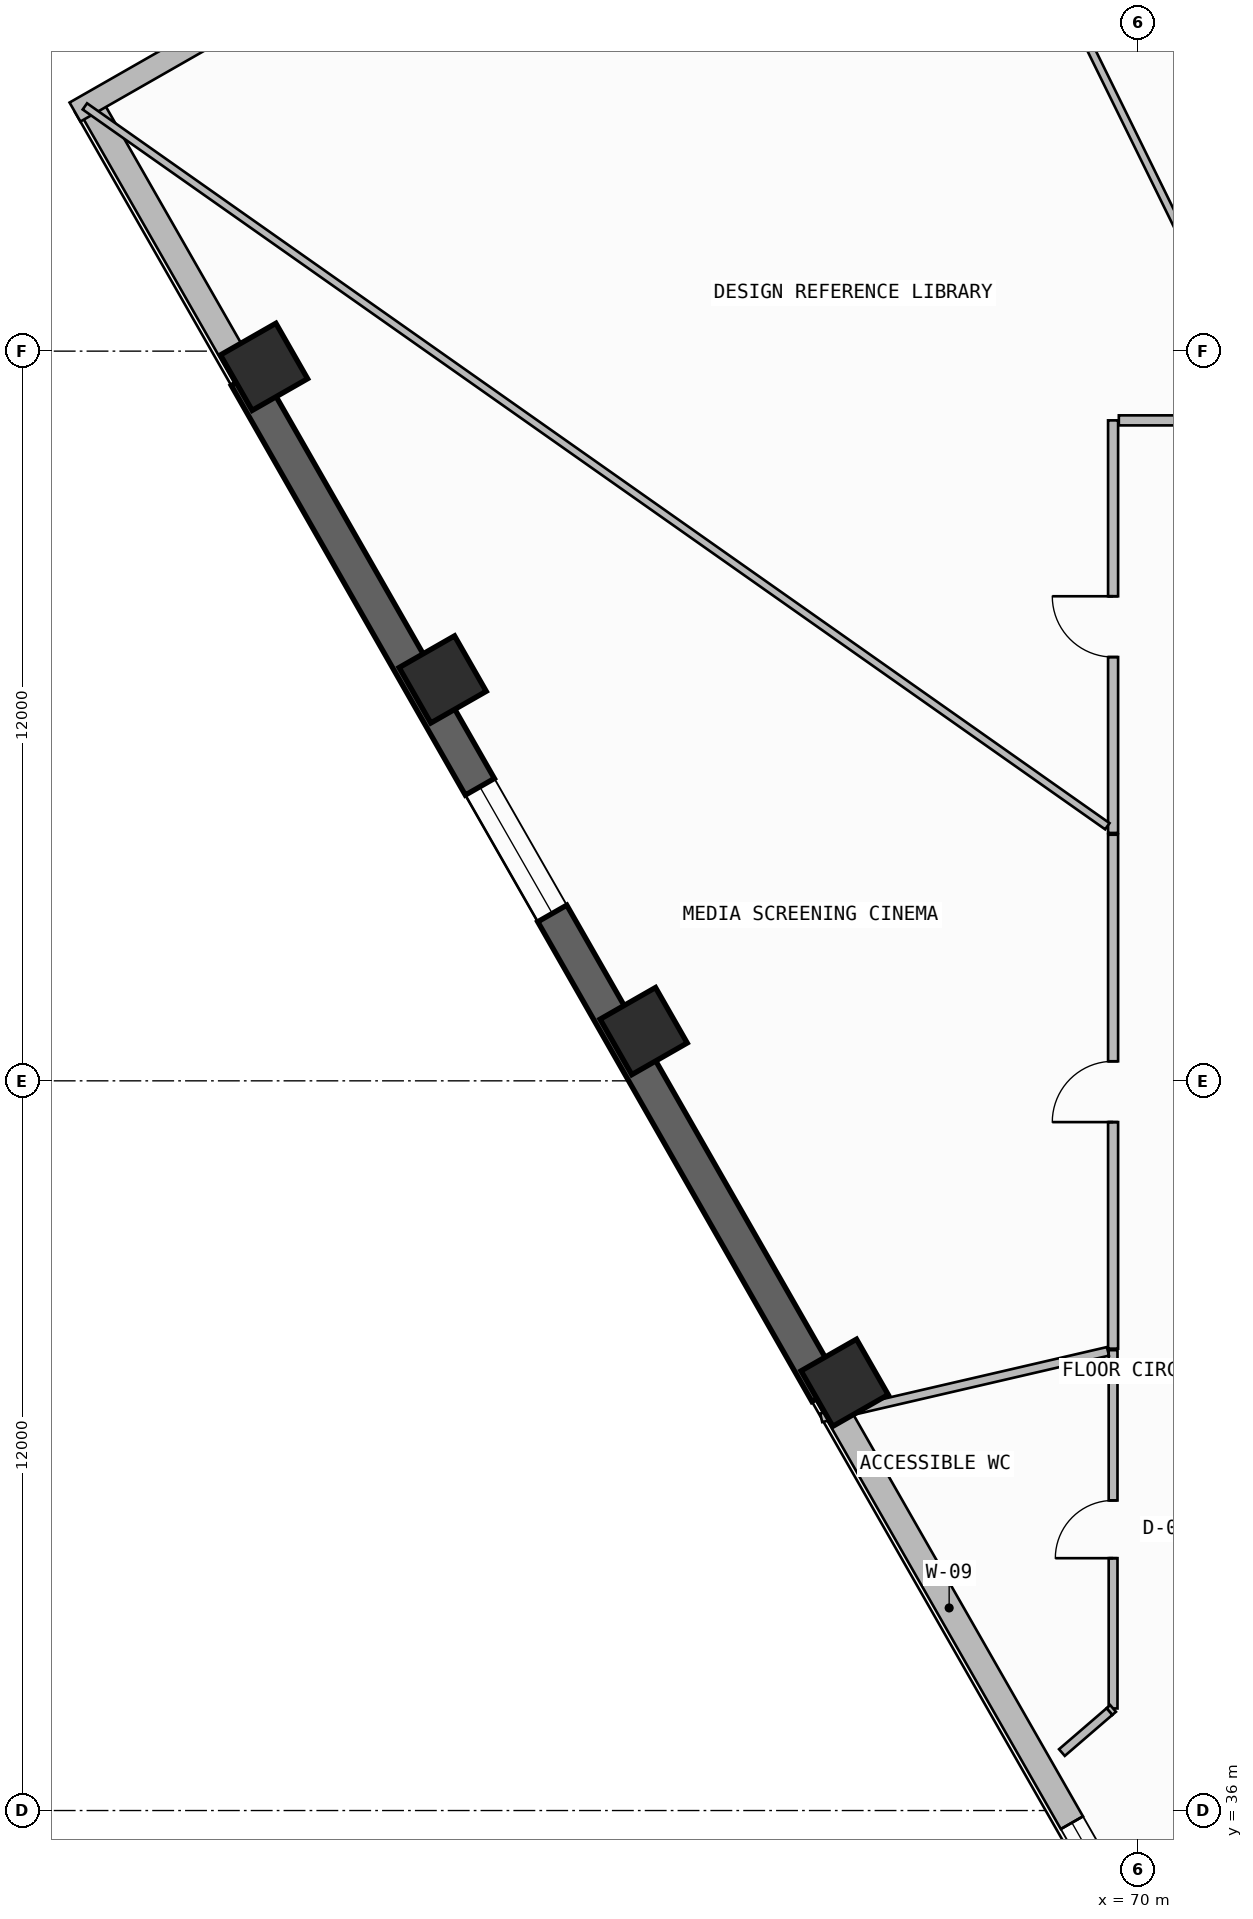
"""IFC4 building model, lengths in metres.
Left out: names, types, materials, properties, quantities, classifications, styles, units other than length and angle.
Written with IfcOpenShell. Run it as: python <this file> out.ifc"""

import sys

from ifc_helpers import new_model, si_unit, direction, frame, frame_2d, origin, origin_2d, place, context, subcontext, project, spatial, rectangle, extrude, element, fill, save


model = new_model("IFC4")
c1 = context("Model", 3, precision=1e-05, world=origin(), true_north=direction((0.0, 1.0)))
c2 = subcontext(c1, "Body", "Model", "MODEL_VIEW")
j1 = project(units=[si_unit("LENGTHUNIT", "METRE"), si_unit("PLANEANGLEUNIT", "RADIAN")], contexts=[c1])
p1 = place(None, origin())
s1 = spatial("IfcSite", under=j1, at=p1, CompositionType="ELEMENT")
p2 = place(p1, origin())
s2 = spatial("IfcBuilding", under=s1, at=p2, CompositionType="ELEMENT")
p3 = place(p2, frame((0.0, 0.0, 214.98)))
s3 = spatial("IfcBuildingStorey", under=s2, at=p3, CompositionType="ELEMENT", Elevation=214.98)
for number, where, z_axis, x_axis in (
    (1, (55.625, 59.742, 0.0), (0.0, 0.0, 1.0), (-0.496, 0.868, 0.0)),
    (2, (58.563, 54.601, 0.0), (0.0, 0.0, 1.0), (-0.496, 0.868, 0.0)),
    (3, (61.868, 48.818, 0.0), (0.0, 0.0, 1.0), (-0.496, 0.868, 0.0)),
    (4, (65.173, 43.035, 0.0), (0.0, 0.0, 1.0), (-0.496, 0.868, 0.0)),
):
    element("IfcColumn", number, at=place(p3, frame(where, z_axis=z_axis, x_axis=x_axis)), inside=s3, PredefinedType="COLUMN", context=c2, shape_type="SweptSolid", body=[
        extrude(rectangle(XDim=1.05, YDim=1.05, at=origin_2d()), origin(), (0.0, 0.0, 1.0), 3.52),
    ])
p4 = place(p3, frame((52.754, 64.068, 0.0), z_axis=(0.0, 0.0, 1.0), x_axis=(0.496209984367, -0.868202540548, 0.0)))
e5 = element("IfcWall", 5, at=p4, inside=s3, PredefinedType="SOLIDWALL", context=c2, shape_type="SweptSolid", body=[
    extrude(rectangle(XDim=5.181, YDim=0.42, at=frame_2d((2.59, 0.0))), origin(), (0.0, 0.0, 1.0), 2.645),
])
p5 = place(p3, frame((55.325, 59.57, -0.26), z_axis=(0.0, 0.0, 1.0), x_axis=(0.496211351597, -0.868201759124, 0.0)))
e6 = element("IfcWall", 6, at=p5, inside=s3, PredefinedType="SHEAR", context=c2, shape_type="SweptSolid", body=[
    extrude(rectangle(XDim=19.243, YDim=0.55, at=frame_2d((9.622, 0.0))), origin(), (0.0, 0.0, 1.0), 3.52),
])
p6 = place(p5, frame((7.757, 0.0, 1.1)))
e7 = element("IfcOpeningElement", 7, at=p6, cuts=e6, PredefinedType="OPENING", context=c2, shape_type="SweptSolid", body=[
    extrude(rectangle(XDim=2.4, YDim=1.2, at=frame_2d((1.2, 0.6))), frame((0.0, 0.285, 0.0), z_axis=(0.0, -1.0, 0.0), x_axis=(1.0, 0.0, 0.0)), (0.0, 0.0, 1.0), 0.57),
])
p7 = place(p3, frame((64.874, 42.864, 0.0), z_axis=(0.0, 0.0, 1.0), x_axis=(0.49622043329, -0.868196568517, 0.0)))
e8 = element("IfcWall", 8, at=p7, inside=s3, PredefinedType="SOLIDWALL", context=c2, shape_type="SweptSolid", body=[
    extrude(rectangle(XDim=12.582, YDim=0.42, at=frame_2d((6.291, 0.0))), origin(), (0.0, 0.0, 1.0), 2.645),
])
p8 = place(p7, frame((8.136, 0.0, 1.1)))
e9 = element("IfcOpeningElement", 9, at=p8, cuts=e8, PredefinedType="OPENING", context=c2, shape_type="SweptSolid", body=[
    extrude(rectangle(XDim=2.4, YDim=1.2, at=frame_2d((1.2, 0.6))), frame((0.0, 0.22, 0.0), z_axis=(0.0, -1.0, 0.0), x_axis=(1.0, 0.0, 0.0)), (0.0, 0.0, 1.0), 0.44),
])
p9 = place(p3, frame((54.599, 65.123, 0.0), z_axis=(0.0, 0.0, 1.0), x_axis=(-0.86818053093, -0.4962484919, 0.0)))
e10 = element("IfcWall", 10, at=p9, inside=s3, PredefinedType="SOLIDWALL", context=c2, shape_type="SweptSolid", body=[
    extrude(rectangle(XDim=2.4, YDim=0.36, at=frame_2d((1.2, 0.0))), origin(), (0.0, 0.0, 1.0), 3.26),
])
p10 = place(p3, frame((85.424, 63.338, 0.0), z_axis=(0.0, 0.0, 1.0), x_axis=(-0.993364714048, 0.115006716693, 0.0)))
e11 = element("IfcWall", 11, at=p10, inside=s3, PredefinedType="PARAPET", context=c2, shape_type="SweptSolid", body=[
    extrude(rectangle(XDim=26.302, YDim=0.2, at=frame_2d((13.151, 0.0))), origin(), (0.0, 0.0, 1.0), 1.15),
])
p11 = place(p3, frame((69.589, 43.571, 0.0), z_axis=(0.0, 0.0, 1.0), x_axis=(0.0, -1.0, 0.0)))
e12 = element("IfcWall", 12, at=p11, inside=s3, PredefinedType="PARTITIONING", context=c2, shape_type="SweptSolid", body=[
    extrude(rectangle(XDim=5.892, YDim=0.145, at=frame_2d((2.946, 0.0))), origin(), (0.0, 0.0, 1.0), 3.26),
])
p12 = place(p11, frame((2.471, 0.0, 0.0)))
e13 = element("IfcOpeningElement", 13, at=p12, cuts=e12, PredefinedType="OPENING", context=c2, shape_type="SweptSolid", body=[
    extrude(rectangle(XDim=0.95, YDim=2.15, at=frame_2d((0.475, 1.075))), frame((0.0, 0.083, 0.0), z_axis=(0.0, -1.0, 0.0), x_axis=(1.0, 0.0, 0.0)), (0.0, 0.0, 1.0), 0.165),
])
p13 = place(p3, frame((69.589, 37.679, 0.0), z_axis=(0.0, 0.0, 1.0), x_axis=(-0.759038758193, -0.651045438938, 0.0)))
e14 = element("IfcWall", 14, at=p13, inside=s3, PredefinedType="PARTITIONING", context=c2, shape_type="SweptSolid", body=[
    extrude(rectangle(XDim=0.079, YDim=0.145, at=frame_2d((0.04, 0.0))), origin(), (0.0, 0.0, 1.0), 3.26),
])
p14 = place(p3, frame((64.789, 42.458, 0.0), z_axis=(0.0, 0.0, 1.0), x_axis=(0.974184220903, 0.225754520982, 0.0)))
e15 = element("IfcWall", 15, at=p14, inside=s3, PredefinedType="PARTITIONING", context=c2, shape_type="SweptSolid", body=[
    extrude(rectangle(XDim=4.841, YDim=0.145, at=frame_2d((2.42, 0.0))), origin(), (0.0, 0.0, 1.0), 3.26),
])
p15 = place(p3, frame((72.187, 58.929, 0.0), z_axis=(0.0, 0.0, 1.0), x_axis=(-0.440808632893, 0.897601108047, 0.0)))
e16 = element("IfcWall", 16, at=p15, inside=s3, PredefinedType="PARTITIONING", context=c2, shape_type="SweptSolid", body=[
    extrude(rectangle(XDim=7.209, YDim=0.125, at=frame_2d((3.605, 0.0))), origin(), (0.0, 0.0, 1.0), 3.26),
])
p16 = place(p3, frame((69.589, 58.861, 0.0), z_axis=(0.0, 0.0, 1.0), x_axis=(0.0, -1.0, 0.0)))
e17 = element("IfcWall", 17, at=p16, inside=s3, PredefinedType="PARTITIONING", context=c2, shape_type="SweptSolid", body=[
    extrude(rectangle(XDim=6.785, YDim=0.165, at=frame_2d((3.393, 0.0))), origin(), (0.0, 0.0, 1.0), 2.745),
])
p17 = place(p16, frame((2.893, 0.0, 0.0)))
e18 = element("IfcOpeningElement", 18, at=p17, cuts=e17, PredefinedType="OPENING", context=c2, shape_type="SweptSolid", body=[
    extrude(rectangle(XDim=1.0, YDim=2.2, at=frame_2d((0.5, 1.1))), frame((0.0, 0.093, 0.0), z_axis=(0.0, -1.0, 0.0), x_axis=(1.0, 0.0, 0.0)), (0.0, 0.0, 1.0), 0.185),
])
p18 = place(p3, frame((72.16, 58.861, 0.0), z_axis=(0.0, 0.0, 1.0), x_axis=(-1.0, 0.0, 0.0)))
e19 = element("IfcWall", 19, at=p18, inside=s3, PredefinedType="PARTITIONING", context=c2, shape_type="SweptSolid", body=[
    extrude(rectangle(XDim=2.477, YDim=0.165, at=frame_2d((1.239, 0.0))), origin(), (0.0, 0.0, 1.0), 3.26),
])
p19 = place(p3, frame((69.494, 52.187, 0.0), z_axis=(0.0, 0.0, 1.0), x_axis=(-0.817704178427, 0.575638668422, 0.0)))
e20 = element("IfcWall", 20, at=p19, inside=s3, PredefinedType="PARTITIONING", context=c2, shape_type="SweptSolid", body=[
    extrude(rectangle(XDim=20.565, YDim=0.125, at=frame_2d((10.282, 0.0))), origin(), (0.0, 0.0, 1.0), 2.645),
])
p20 = place(p3, frame((69.589, 52.047, 0.0), z_axis=(0.0, 0.0, 1.0), x_axis=(0.0, -1.0, 0.0)))
e21 = element("IfcWall", 21, at=p20, inside=s3, PredefinedType="PARTITIONING", context=c2, shape_type="SweptSolid", body=[
    extrude(rectangle(XDim=8.452, YDim=0.165, at=frame_2d((4.226, 0.0))), origin(), (0.0, 0.0, 1.0), 2.745),
])
p21 = place(p20, frame((3.726, 0.0, 0.0)))
e22 = element("IfcOpeningElement", 22, at=p21, cuts=e21, PredefinedType="OPENING", context=c2, shape_type="SweptSolid", body=[
    extrude(rectangle(XDim=1.0, YDim=2.2, at=frame_2d((0.5, 1.1))), frame((0.0, 0.093, 0.0), z_axis=(0.0, -1.0, 0.0), x_axis=(1.0, 0.0, 0.0)), (0.0, 0.0, 1.0), 0.185),
])
p22 = place(p3, frame((69.529, 37.627, 0.0), z_axis=(0.0, 0.0, 1.0), x_axis=(-0.757466453998, -0.652874085155, 0.0)))
e23 = element("IfcWall", 23, at=p22, inside=s3, PredefinedType="PARTITIONING", context=c2, shape_type="SweptSolid", body=[
    extrude(rectangle(XDim=1.032, YDim=0.145, at=frame_2d((0.516, 0.0))), origin(), (0.0, 0.0, 1.0), 3.26),
])
p23 = place(p6, origin())
e24 = element("IfcWindow", 24, at=p23, inside=s3, PartitioningType="SINGLE_PANEL", PredefinedType="WINDOW", context=c2, shape_type="SweptSolid", body=[
    extrude(rectangle(XDim=2.4, YDim=1.2, at=frame_2d((1.2, 0.6))), frame((0.0, 0.03, 0.0), z_axis=(0.0, -1.0, 0.0), x_axis=(1.0, 0.0, 0.0)), (0.0, 0.0, 1.0), 0.06),
])
fill(e7, e24)
p24 = place(p8, origin())
e25 = element("IfcWindow", 25, at=p24, inside=s3, PartitioningType="SINGLE_PANEL", PredefinedType="WINDOW", context=c2, shape_type="SweptSolid", body=[
    extrude(rectangle(XDim=2.4, YDim=1.2, at=frame_2d((1.2, 0.6))), frame((0.0, 0.03, 0.0), z_axis=(0.0, -1.0, 0.0), x_axis=(1.0, 0.0, 0.0)), (0.0, 0.0, 1.0), 0.06),
])
fill(e9, e25)
p25 = place(p12, frame((0.95, 0.0, 0.0), z_axis=(0.0, 0.0, 1.0), x_axis=(-1.0, 0.0, 0.0)))
e26 = element("IfcDoor", 26, at=p25, inside=s3, OperationType="SINGLE_SWING_LEFT", PredefinedType="DOOR", context=c2, shape_type="SweptSolid", body=[
    extrude(rectangle(XDim=0.95, YDim=2.15, at=frame_2d((0.475, 1.075))), frame((0.0, 0.025, 0.0), z_axis=(0.0, -1.0, 0.0), x_axis=(1.0, 0.0, 0.0)), (0.0, 0.0, 1.0), 0.05),
])
fill(e13, e26)
p26 = place(p17, frame((1.0, 0.0, 0.0), z_axis=(0.0, 0.0, 1.0), x_axis=(-1.0, 0.0, 0.0)))
e27 = element("IfcDoor", 27, at=p26, inside=s3, OperationType="SINGLE_SWING_RIGHT", PredefinedType="DOOR", context=c2, shape_type="SweptSolid", body=[
    extrude(rectangle(XDim=1.0, YDim=2.2, at=frame_2d((0.5, 1.1))), frame((0.0, 0.025, 0.0), z_axis=(0.0, -1.0, 0.0), x_axis=(1.0, 0.0, 0.0)), (0.0, 0.0, 1.0), 0.05),
])
fill(e18, e27)
p27 = place(p21, frame((1.0, 0.0, 0.0), z_axis=(0.0, 0.0, 1.0), x_axis=(-1.0, 0.0, 0.0)))
e28 = element("IfcDoor", 28, at=p27, inside=s3, OperationType="SINGLE_SWING_LEFT", PredefinedType="DOOR", context=c2, shape_type="SweptSolid", body=[
    extrude(rectangle(XDim=1.0, YDim=2.2, at=frame_2d((0.5, 1.1))), frame((0.0, 0.025, 0.0), z_axis=(0.0, -1.0, 0.0), x_axis=(1.0, 0.0, 0.0)), (0.0, 0.0, 1.0), 0.05),
])
fill(e22, e28)
save(model, sys.argv[1])
